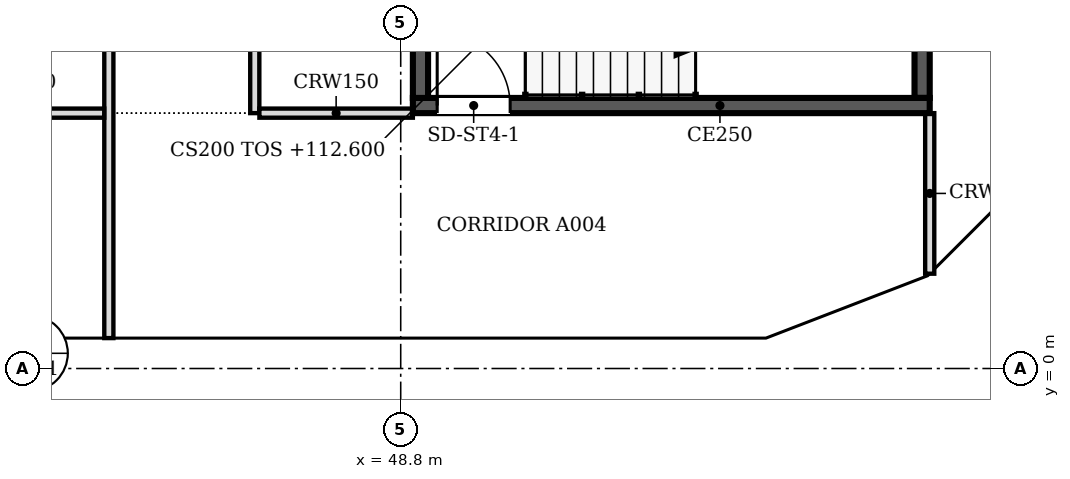
"""IFC4 building model, lengths in metres.
Left out: names, types, materials, properties, quantities, classifications, styles, units other than length and angle.
Written with IfcOpenShell. Run it as: python <this file> out.ifc"""

import sys

from ifc_helpers import new_model, si_unit, direction, frame, frame_2d, origin, place, context, subcontext, project, spatial, polyline, rectangle, outline, extrude, faceted_brep, source, transform, mapped, element, fill, save


model = new_model("IFC4")
c1 = context("Model", 3, precision=1e-05, world=origin(), true_north=direction((0.0, 1.0)))
c2 = subcontext(c1, "Body", "Model", "MODEL_VIEW")
j1 = project(units=[si_unit("LENGTHUNIT", "METRE"), si_unit("PLANEANGLEUNIT", "RADIAN")], contexts=[c1])
p1 = place(None, origin())
s1 = spatial("IfcSite", under=j1, at=p1, CompositionType="ELEMENT")
p2 = place(p1, origin())
s2 = spatial("IfcBuilding", under=s1, at=p2, CompositionType="ELEMENT")
p3 = place(p2, frame((0.0, 0.0, 112.6)))
s3 = spatial("IfcBuildingStorey", under=s2, at=p3, CompositionType="ELEMENT", Elevation=112.6)
m1 = source(origin(), c2, "Body", "SweptSolid", [
    extrude(outline(polyline([(6.1, 0.0), (3.05, 3.8), (0.0, 0.0), (6.1, 0.0)])), frame((0.0, 0.25, 0.0), z_axis=(0.0, -1.0, 0.0), x_axis=(1.0, 0.0, 0.0)), (0.0, 0.0, 1.0), 0.5),
])
p4 = place(p3, frame((39.65, 0.25, 0.0), z_axis=(0.0, 0.0, 1.0), x_axis=(1.0, 0.0, 0.0)))
e1 = element("IfcWall", 1, at=p4, inside=s3, PredefinedType="SOLIDWALL", context=c2, shape_type="MappedRepresentation", body=[
    mapped(m1, transform((0.0, 0.0, 0.0), scale=1.0)),
])
m2 = source(origin(), c2, "Body", "SweptSolid", [
    extrude(outline(polyline([(5.579, 0.25), (3.05, 3.4), (0.521, 0.25), (5.579, 0.25)])), frame((0.0, 0.26, 0.0), z_axis=(0.0, -1.0, 0.0), x_axis=(1.0, 0.0, 0.0)), (0.0, 0.0, 1.0), 0.52),
])
p5 = place(p4, origin())
e2 = element("IfcOpeningElement", 2, at=p5, cuts=e1, PredefinedType="OPENING", context=c2, shape_type="MappedRepresentation", body=[
    mapped(m2, transform((0.0, 0.0, 0.0), scale=1.0)),
])
p6 = place(p3, frame((45.75, 0.25, 0.0), z_axis=(0.0, 0.0, 1.0), x_axis=(1.0, 0.0, 0.0)))
e3 = element("IfcWall", 3, at=p6, inside=s3, PredefinedType="SOLIDWALL", context=c2, shape_type="MappedRepresentation", body=[
    mapped(m1, transform((0.0, 0.0, 0.0), scale=1.0)),
])
p7 = place(p6, origin())
e4 = element("IfcOpeningElement", 4, at=p7, cuts=e3, PredefinedType="OPENING", context=c2, shape_type="MappedRepresentation", body=[
    mapped(m2, transform((0.0, 0.0, 0.0), scale=1.0)),
])
m3 = source(origin(), c2, "Body", "Brep", [
    faceted_brep([(3.05, -0.25, 3.74), (3.003, -0.25, 3.8), (0.0, -0.25, 0.0), (3.05, -0.25, 0.0), (0.0, 0.25, 0.0), (2.957, 0.25, 3.741), (2.957, 0.25, 0.0), (3.003, 0.0, 3.8)], [[[0, 1, 2, 3]], [[4, 5, 6]], [[7, 1, 0]], [[5, 4, 2, 1, 7]], [[4, 6, 3, 2]], [[3, 6, 5, 7, 0]]]),
])
p8 = place(p3, frame((51.85, 0.25, 0.0), z_axis=(0.0, 0.0, 1.0), x_axis=(1.0, 0.0, 0.0)))
e5 = element("IfcWall", 5, at=p8, inside=s3, PredefinedType="SOLIDWALL", context=c2, shape_type="MappedRepresentation", body=[
    mapped(m3, transform((0.0, 0.0, 0.0), scale=1.0)),
])
m4 = source(origin(), c2, "Body", "SweptSolid", [
    extrude(outline(polyline([(2.803, 3.144), (0.516, 0.25), (2.803, 0.25), (2.803, 3.144)])), frame((0.0, 0.26, 0.0), z_axis=(0.0, -1.0, 0.0), x_axis=(1.0, 0.0, 0.0)), (0.0, 0.0, 1.0), 0.52),
])
p9 = place(p8, origin())
e6 = element("IfcOpeningElement", 6, at=p9, cuts=e5, PredefinedType="OPENING", context=c2, shape_type="MappedRepresentation", body=[
    mapped(m4, transform((0.0, 0.0, 0.0), scale=1.0)),
])
m5 = source(origin(), c2, "Body", "Brep", [
    faceted_brep([(2.997, -0.25, 0.0), (0.047, -0.25, 3.8), (0.0, -0.25, 3.741), (0.0, -0.25, 0.0), (0.093, 0.25, 3.74), (2.944, 0.25, 0.068), (2.944, 0.25, 0.0), (0.093, 0.25, 0.0), (0.047, 0.0, 3.8), (2.997, 0.0, 0.0)], [[[0, 1, 2, 3]], [[4, 5, 6, 7]], [[5, 4, 8, 1, 0, 9]], [[2, 1, 8]], [[7, 6, 9, 0, 3]], [[7, 3, 2, 8, 4]], [[9, 6, 5]]]),
])
p10 = place(p3, frame((54.81, 0.233, 0.0), z_axis=(0.0, 0.0, 1.0), x_axis=(0.932990326376, 0.359901446078, 0.0)))
e7 = element("IfcWall", 7, at=p10, inside=s3, PredefinedType="SOLIDWALL", context=c2, shape_type="MappedRepresentation", body=[
    mapped(m5, transform((0.0, 0.0, 0.0), scale=1.0)),
])
m6 = source(origin(), c2, "Body", "SweptSolid", [
    extrude(outline(polyline([(2.487, 0.25), (0.247, 3.135), (0.247, 0.25), (2.487, 0.25)])), frame((0.0, 0.26, 0.0), z_axis=(0.0, -1.0, 0.0), x_axis=(1.0, 0.0, 0.0)), (0.0, 0.0, 1.0), 0.52),
])
p11 = place(p10, origin())
e8 = element("IfcOpeningElement", 8, at=p11, cuts=e7, PredefinedType="OPENING", context=c2, shape_type="MappedRepresentation", body=[
    mapped(m6, transform((0.0, 0.0, 0.0), scale=1.0)),
])
m7 = source(origin(), c2, "Body", "Brep", [
    faceted_brep([(2.997, -0.25, 3.732), (2.944, -0.25, 3.8), (0.0, -0.25, 0.0), (2.997, -0.25, 0.0), (0.053, 0.25, 0.068), (2.891, 0.25, 3.732), (2.891, 0.25, 0.0), (0.053, 0.25, 0.0), (2.944, 0.0, 3.8), (0.0, 0.0, 0.0)], [[[0, 1, 2, 3]], [[4, 5, 6, 7]], [[8, 1, 0]], [[5, 4, 9, 2, 1, 8]], [[7, 6, 3, 2, 9]], [[7, 9, 4]], [[3, 6, 5, 8, 0]]]),
])
p12 = place(p3, frame((57.606, 1.312, 0.0), z_axis=(0.0, 0.0, 1.0), x_axis=(0.707147509625, 0.707066050402, 0.0)))
e9 = element("IfcWall", 9, at=p12, inside=s3, PredefinedType="SOLIDWALL", context=c2, shape_type="MappedRepresentation", body=[
    mapped(m7, transform((0.0, 0.0, 0.0), scale=1.0)),
])
m8 = source(origin(), c2, "Body", "SweptSolid", [
    extrude(outline(polyline([(2.744, 3.134), (0.51, 0.25), (2.744, 0.25), (2.744, 3.134)])), frame((0.0, 0.26, 0.0), z_axis=(0.0, -1.0, 0.0), x_axis=(1.0, 0.0, 0.0)), (0.0, 0.0, 1.0), 0.52),
])
p13 = place(p12, origin())
e10 = element("IfcOpeningElement", 10, at=p13, cuts=e9, PredefinedType="OPENING", context=c2, shape_type="MappedRepresentation", body=[
    mapped(m8, transform((0.0, 0.0, 0.0), scale=1.0)),
])
p14 = place(p2, frame((0.0, 0.0, 116.4)))
s4 = spatial("IfcBuildingStorey", under=s2, at=p14, CompositionType="ELEMENT", Elevation=116.4)
m9 = source(origin(), c2, "Body", "SweptSolid", [
    extrude(outline(polyline([(3.05, 0.0), (6.1, 3.8), (3.05, 7.6), (0.0, 3.8), (3.05, 0.0)])), frame((0.0, 0.25, 0.0), z_axis=(0.0, -1.0, 0.0), x_axis=(1.0, 0.0, 0.0)), (0.0, 0.0, 1.0), 0.5),
])
p15 = place(p14, frame((42.7, 0.25, -3.8), z_axis=(0.0, 0.0, 1.0), x_axis=(1.0, 0.0, 0.0)))
e11 = element("IfcWall", 11, at=p15, inside=s4, PredefinedType="SOLIDWALL", context=c2, shape_type="MappedRepresentation", body=[
    mapped(m9, transform((0.0, 0.0, 0.0), scale=1.0)),
])
m10 = source(origin(), c2, "Body", "SweptSolid", [
    extrude(outline(polyline([(3.05, 0.399), (5.78, 3.8), (3.05, 7.2), (0.321, 3.8), (3.05, 0.399)])), frame((0.0, 0.26, 0.0), z_axis=(0.0, -1.0, 0.0), x_axis=(1.0, 0.0, 0.0)), (0.0, 0.0, 1.0), 0.52),
])
p16 = place(p15, origin())
e12 = element("IfcOpeningElement", 12, at=p16, cuts=e11, PredefinedType="OPENING", context=c2, shape_type="MappedRepresentation", body=[
    mapped(m10, transform((0.0, 0.0, 0.0), scale=1.0)),
])
m11 = source(origin(), c2, "Body", "Brep", [
    faceted_brep([(3.05, -0.25, 0.0), (6.053, -0.25, 3.8), (3.05, -0.25, 7.6), (0.0, -0.25, 3.8), (0.0, 0.25, 3.8), (3.05, 0.25, 7.6), (6.007, 0.25, 3.859), (6.007, 0.25, 3.741), (3.05, 0.25, 0.0), (6.053, 0.0, 3.8)], [[[0, 1, 2, 3]], [[4, 5, 6, 7, 8]], [[8, 7, 9, 1, 0]], [[6, 5, 2, 1, 9]], [[5, 4, 3, 2]], [[4, 8, 0, 3]], [[9, 7, 6]]]),
])
p17 = place(p14, frame((48.8, 0.25, -3.8), z_axis=(0.0, 0.0, 1.0), x_axis=(1.0, 0.0, 0.0)))
e13 = element("IfcWall", 13, at=p17, inside=s4, PredefinedType="SOLIDWALL", context=c2, shape_type="MappedRepresentation", body=[
    mapped(m11, transform((0.0, 0.0, 0.0), scale=1.0)),
])
m12 = source(origin(), c2, "Body", "SweptSolid", [
    extrude(outline(polyline([(3.049, 0.401), (5.735, 3.8), (3.049, 7.199), (0.321, 3.8), (3.049, 0.401)])), frame((0.0, 0.26, 0.0), z_axis=(0.0, -1.0, 0.0), x_axis=(1.0, 0.0, 0.0)), (0.0, 0.0, 1.0), 0.52),
])
p18 = place(p17, origin())
e14 = element("IfcOpeningElement", 14, at=p18, cuts=e13, PredefinedType="OPENING", context=c2, shape_type="MappedRepresentation", body=[
    mapped(m12, transform((0.0, 0.0, 0.0), scale=1.0)),
])
m13 = source(origin(), c2, "Body", "Brep", [
    faceted_brep([(2.95, -0.25, 0.0), (3.003, -0.25, 0.068), (3.003, -0.25, 7.531), (2.95, -0.25, 7.6), (0.0, -0.25, 3.8), (0.047, 0.25, 3.86), (2.898, 0.25, 7.532), (2.898, 0.25, 0.068), (0.047, 0.25, 3.74), (2.95, 0.0, 0.0), (2.95, 0.0, 7.6), (0.0, 0.0, 3.8)], [[[0, 1, 2, 3, 4]], [[5, 6, 7, 8]], [[1, 0, 9]], [[10, 3, 2]], [[6, 5, 11, 4, 3, 10]], [[8, 7, 9, 0, 4, 11]], [[8, 11, 5]], [[1, 9, 7, 6, 10, 2]]]),
])
p19 = place(p14, frame((54.854, 0.25, -3.8), z_axis=(0.0, 0.0, 1.0), x_axis=(0.932970071518, 0.359953949349, 0.0)))
e15 = element("IfcWall", 15, at=p19, inside=s4, PredefinedType="SOLIDWALL", context=c2, shape_type="MappedRepresentation", body=[
    mapped(m13, transform((0.0, 0.0, 0.0), scale=1.0)),
])
m14 = source(origin(), c2, "Body", "SweptSolid", [
    extrude(outline(polyline([(2.75, 6.935), (0.316, 3.8), (2.75, 0.665), (2.75, 6.935)])), frame((0.0, 0.26, 0.0), z_axis=(0.0, -1.0, 0.0), x_axis=(1.0, 0.0, 0.0)), (0.0, 0.0, 1.0), 0.52),
])
p20 = place(p19, origin())
e16 = element("IfcOpeningElement", 16, at=p20, cuts=e15, PredefinedType="OPENING", context=c2, shape_type="MappedRepresentation", body=[
    mapped(m14, transform((0.0, 0.0, 0.0), scale=1.0)),
])
m15 = source(origin(), c2, "Body", "Brep", [
    faceted_brep([(0.053, -0.25, 0.0), (2.997, -0.25, 3.8), (0.053, -0.25, 7.6), (0.0, -0.25, 7.532), (0.0, -0.25, 0.068), (0.106, 0.25, 7.531), (2.944, 0.25, 3.868), (2.944, 0.25, 3.732), (0.106, 0.25, 0.068), (2.997, 0.0, 3.8), (0.053, 0.0, 0.0), (0.053, 0.0, 7.6)], [[[0, 1, 2, 3, 4]], [[5, 6, 7, 8]], [[8, 7, 9, 1, 0, 10]], [[6, 5, 11, 2, 1, 9]], [[3, 2, 11]], [[10, 0, 4]], [[8, 10, 4, 3, 11, 5]], [[9, 7, 6]]]),
])
p21 = place(p14, frame((57.569, 1.274, -3.8), z_axis=(0.0, 0.0, 1.0), x_axis=(0.707066050402, 0.707147509625, 0.0)))
e17 = element("IfcWall", 17, at=p21, inside=s4, PredefinedType="SOLIDWALL", context=c2, shape_type="MappedRepresentation", body=[
    mapped(m15, transform((0.0, 0.0, 0.0), scale=1.0)),
])
m16 = source(origin(), c2, "Body", "SweptSolid", [
    extrude(outline(polyline([(0.253, 0.666), (2.681, 3.8), (0.253, 6.934), (0.253, 0.666)])), frame((0.0, 0.26, 0.0), z_axis=(0.0, -1.0, 0.0), x_axis=(1.0, 0.0, 0.0)), (0.0, 0.0, 1.0), 0.52),
])
p22 = place(p21, origin())
e18 = element("IfcOpeningElement", 18, at=p22, cuts=e17, PredefinedType="OPENING", context=c2, shape_type="MappedRepresentation", body=[
    mapped(m16, transform((0.0, 0.0, 0.0), scale=1.0)),
])
p23 = place(p3, frame((57.5, 4.325, 0.0), z_axis=(0.0, 0.0, 1.0), x_axis=(-1.0, 0.0, 0.0)))
e19 = element("IfcWall", 19, at=p23, inside=s3, PredefinedType="SOLIDWALL", context=c2, shape_type="SweptSolid", body=[
    extrude(rectangle(XDim=8.5, YDim=0.25, at=frame_2d((4.25, 0.0))), origin(), (0.0, 0.0, 1.0), 3.8),
])
m17 = source(origin(), c2, "Body", "SweptSolid", [
    extrude(rectangle(XDim=1.2, YDim=2.1, at=frame_2d((0.6, 1.05))), frame((0.0, 0.135, 0.0), z_axis=(0.0, -1.0, 0.0), x_axis=(1.0, 0.0, 0.0)), (0.0, 0.0, 1.0), 0.27),
])
p24 = place(p23, frame((6.9, 0.0, 0.0)))
e20 = element("IfcOpeningElement", 20, at=p24, cuts=e19, PredefinedType="OPENING", context=c2, shape_type="MappedRepresentation", body=[
    mapped(m17, transform((0.0, 0.0, 0.0), scale=1.0)),
])
for number, where, z_axis, x_axis in (
    (21, (49.125, 4.45, 0.0), (0.0, 0.0, 1.0), (0.0, 1.0, 0.0)),
    (22, (57.375, 7.85, 0.0), (0.0, 0.0, 1.0), (0.0, -1.0, 0.0)),
):
    element("IfcWall", number, at=place(p3, frame(where, z_axis=z_axis, x_axis=x_axis)), inside=s3, PredefinedType="SOLIDWALL", context=c2, shape_type="SweptSolid", body=[
        extrude(rectangle(XDim=3.4, YDim=0.25, at=frame_2d((1.7, 0.0))), origin(), (0.0, 0.0, 1.0), 3.8),
    ])
p25 = place(p3, frame((44.0, 0.5, 0.0), z_axis=(0.0, 0.0, 1.0), x_axis=(0.0, 1.0, 0.0)))
e23 = element("IfcWall", 23, at=p25, inside=s3, PredefinedType="PARTITIONING", context=c2, shape_type="SweptSolid", body=[
    extrude(rectangle(XDim=21.424, YDim=0.15, at=frame_2d((10.712, 0.0))), origin(), (0.0, 0.0, 1.0), 3.067),
])
m18 = source(origin(), c2, "Body", "SweptSolid", [
    extrude(rectangle(XDim=0.9, YDim=2.1, at=frame_2d((0.45, 1.05))), frame((0.0, 0.085, 0.0), z_axis=(0.0, -1.0, 0.0), x_axis=(1.0, 0.0, 0.0)), (0.0, 0.0, 1.0), 0.17),
])
p26 = place(p25, frame((16.601, 0.0, 0.0)))
e24 = element("IfcOpeningElement", 24, at=p26, cuts=e23, PredefinedType="OPENING", context=c2, shape_type="MappedRepresentation", body=[
    mapped(m18, transform((0.0, 0.0, 0.0), scale=1.0)),
])
m19 = source(origin(), c2, "Body", "SweptSolid", [
    extrude(rectangle(XDim=1.0, YDim=2.1, at=frame_2d((0.5, 1.05))), frame((0.0, 0.085, 0.0), z_axis=(0.0, -1.0, 0.0), x_axis=(1.0, 0.0, 0.0)), (0.0, 0.0, 1.0), 0.17),
])
p27 = place(p25, frame((7.7, 0.0, 0.0)))
e25 = element("IfcOpeningElement", 25, at=p27, cuts=e23, PredefinedType="OPENING", context=c2, shape_type="MappedRepresentation", body=[
    mapped(m19, transform((0.0, 0.0, 0.0), scale=1.0)),
])
p28 = place(p3, frame((57.5, 1.559, 0.0), z_axis=(0.0, 0.0, 1.0), x_axis=(0.0, 1.0, 0.0)))
e26 = element("IfcWall", 26, at=p28, inside=s3, PredefinedType="PARTITIONING", context=c2, shape_type="SweptSolid", body=[
    extrude(rectangle(XDim=2.641, YDim=0.15, at=frame_2d((1.32, 0.0))), origin(), (0.0, 0.0, 1.0), 3.067),
])
p29 = place(p3, frame((40.951, 4.2, 0.0), z_axis=(0.0, 0.0, 1.0), x_axis=(1.0, 0.0, 0.0)))
e27 = element("IfcWall", 27, at=p29, inside=s3, PredefinedType="PARTITIONING", context=c2, shape_type="SweptSolid", body=[
    extrude(rectangle(XDim=2.973, YDim=0.15, at=frame_2d((1.487, 0.0))), origin(), (0.0, 0.0, 1.0), 3.067),
])
p30 = place(p3, frame((46.4, 21.924, 0.0), z_axis=(0.0, 0.0, 1.0), x_axis=(0.0, -1.0, 0.0)))
e28 = element("IfcWall", 28, at=p30, inside=s3, PredefinedType="PARTITIONING", context=c2, shape_type="SweptSolid", body=[
    extrude(rectangle(XDim=17.724, YDim=0.15, at=frame_2d((8.862, 0.0))), origin(), (0.0, 0.0, 1.0), 3.067),
])
p31 = place(p30, frame((3.423, 0.0, 0.0)))
e29 = element("IfcOpeningElement", 29, at=p31, cuts=e28, PredefinedType="OPENING", context=c2, shape_type="MappedRepresentation", body=[
    mapped(m19, transform((0.0, 0.0, 0.0), scale=1.0)),
])
p32 = place(p30, frame((12.324, 0.0, 0.0)))
e30 = element("IfcOpeningElement", 30, at=p32, cuts=e28, PredefinedType="OPENING", context=c2, shape_type="MappedRepresentation", body=[
    mapped(m18, transform((0.0, 0.0, 0.0), scale=1.0)),
])
p33 = place(p3, frame((46.476, 4.2, 0.0), z_axis=(0.0, 0.0, 1.0), x_axis=(1.0, 0.0, 0.0)))
e31 = element("IfcWall", 31, at=p33, inside=s3, PredefinedType="PARTITIONING", context=c2, shape_type="SweptSolid", body=[
    extrude(rectangle(XDim=2.524, YDim=0.15, at=frame_2d((1.262, 0.0))), origin(), (0.0, 0.0, 1.0), 3.067),
])
m20 = source(origin(), c2, "Body", "SweptSolid", [
    extrude(rectangle(XDim=1.2, YDim=2.1, at=frame_2d((0.6, 1.05))), frame((0.0, 0.025, 0.0), z_axis=(0.0, -1.0, 0.0), x_axis=(1.0, 0.0, 0.0)), (0.0, 0.0, 1.0), 0.05),
])
p34 = place(p24, origin())
e32 = element("IfcDoor", 32, at=p34, inside=s3, OperationType="SINGLE_SWING_RIGHT", PredefinedType="DOOR", context=c2, shape_type="MappedRepresentation", body=[
    mapped(m20, transform((0.0, 0.0, 0.0), scale=1.0)),
])
fill(e20, e32)
save(model, sys.argv[1])
